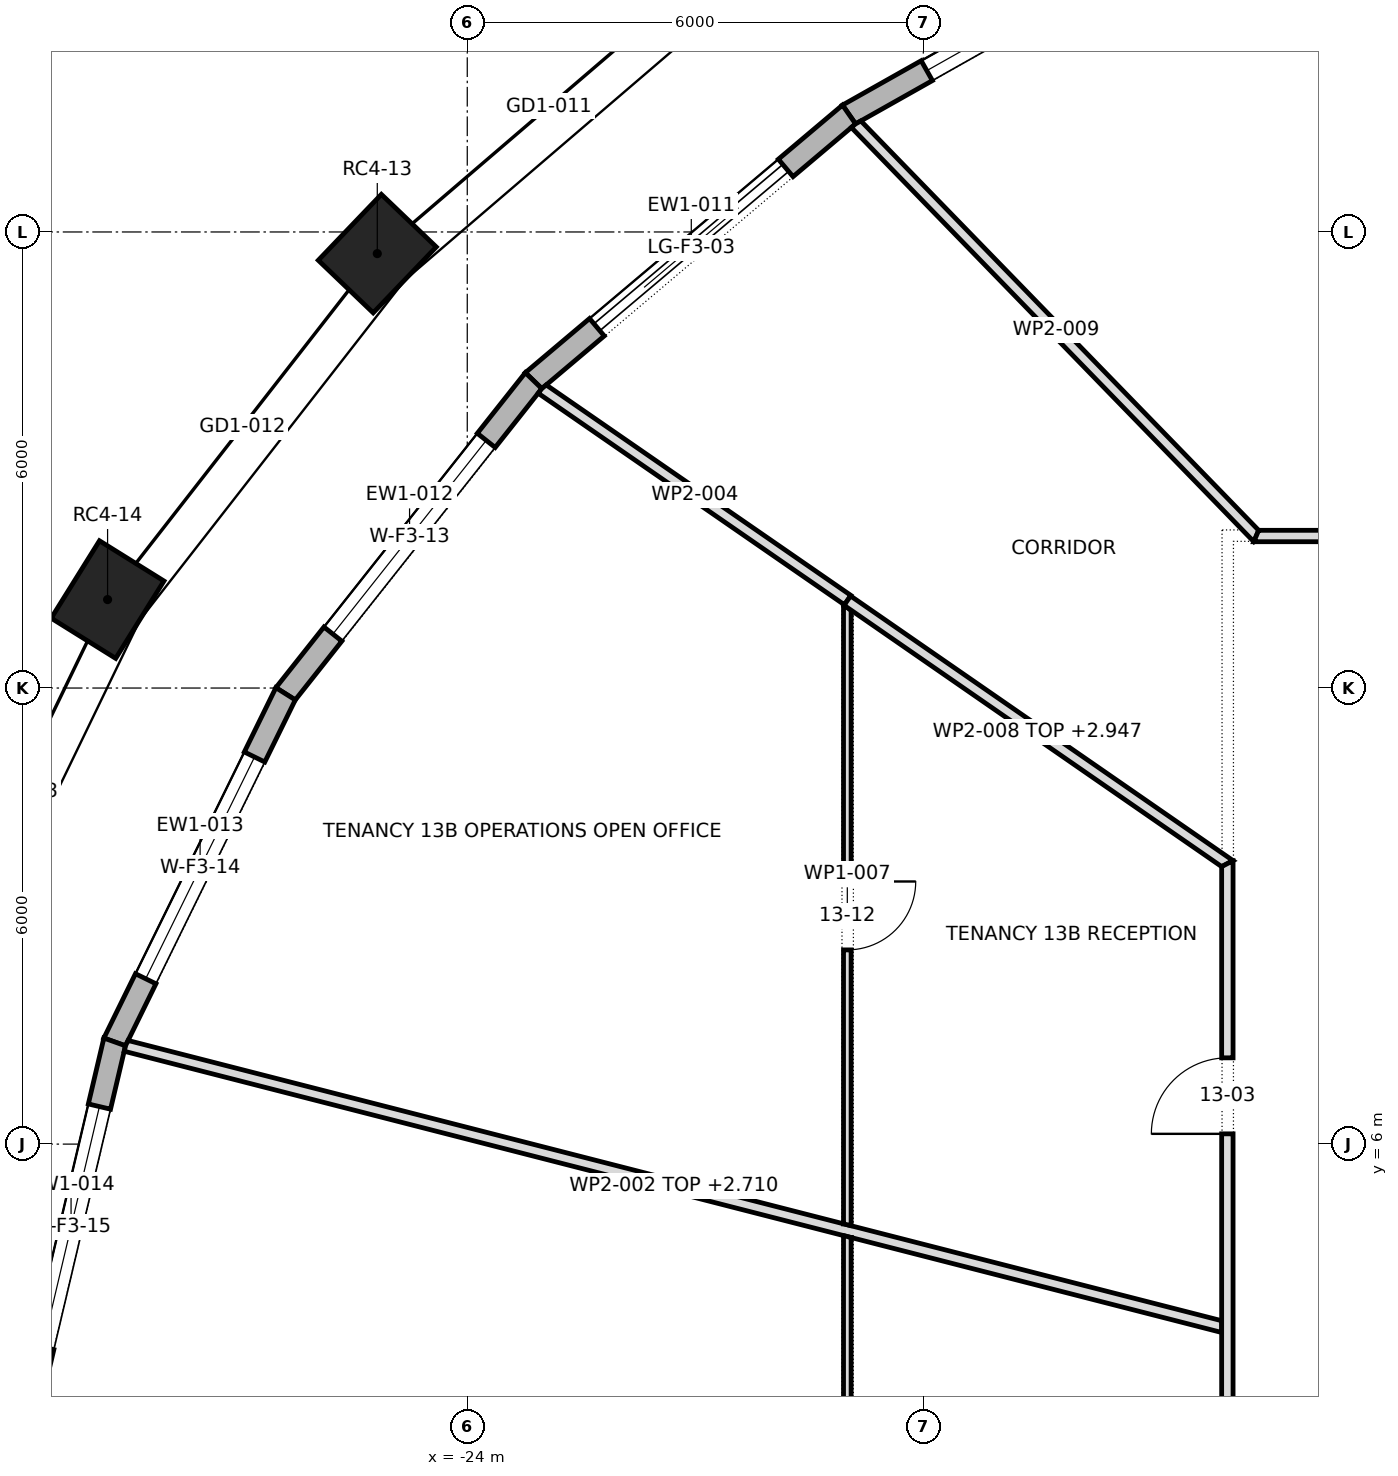
"""IFC4 building model, lengths in metres.
Left out: names, types, materials, properties, quantities, classifications, styles, units other than length and angle.
Written with IfcOpenShell. Run it as: python <this file> out.ifc"""

import sys

from ifc_helpers import new_model, si_unit, direction, frame, frame_2d, origin, origin_2d, place, context, subcontext, project, spatial, polyline, rectangle, outline, extrude, element, fill, save


model = new_model("IFC4")
c1 = context("Model", 3, precision=1e-05, world=origin(), true_north=direction((0.0, 1.0)))
c2 = subcontext(c1, "Body", "Model", "MODEL_VIEW")
j1 = project(units=[si_unit("LENGTHUNIT", "METRE"), si_unit("PLANEANGLEUNIT", "RADIAN")], contexts=[c1])
p1 = place(None, origin())
s1 = spatial("IfcSite", under=j1, at=p1, CompositionType="ELEMENT")
p2 = place(p1, origin())
s2 = spatial("IfcBuilding", under=s1, at=p2, CompositionType="ELEMENT")
p3 = place(p2, frame((0.0, 0.0, 190.9)))
s3 = spatial("IfcBuildingStorey", under=s2, at=p3, CompositionType="ELEMENT", Elevation=190.9)
for number, where, z_axis, x_axis in (
    (1, (-25.184, 17.715, 0.0), (0.0, 0.0, 1.0), (-0.692, -0.722, 0.0)),
    (2, (-28.732, 13.164, 0.0), (0.0, 0.0, 1.0), (-0.529, -0.849, 0.0)),
):
    element("IfcColumn", number, at=place(p3, frame(where, z_axis=z_axis, x_axis=x_axis)), inside=s3, PredefinedType="COLUMN", context=c2, shape_type="SweptSolid", body=[
        extrude(rectangle(XDim=1.2, YDim=1.0, at=origin_2d()), origin(), (0.0, 0.0, 1.0), 4.0),
    ])
p4 = place(p3, frame((-14.1, 22.295, 0.0), z_axis=(0.0, 0.0, 1.0), x_axis=(-0.871083701819, -0.491134588912, 0.0)))
e3 = element("IfcWall", 3, at=p4, inside=s3, PredefinedType="STANDARD", context=c2, shape_type="SweptSolid", body=[
    extrude(outline(polyline([(-0.013, -0.15), (5.614, -0.15), (5.585, 0.15), (0.013, 0.15), (-0.013, -0.15)])), origin(), (0.0, 0.0, 1.0), 3.7),
])
p5 = place(p4, frame((1.175, 0.0, 0.6)))
e4 = element("IfcOpeningElement", 4, at=p5, cuts=e3, PredefinedType="OPENING", context=c2, shape_type="SweptSolid", body=[
    extrude(rectangle(XDim=3.25, YDim=2.65, at=frame_2d((1.625, 1.325))), frame((0.0, 0.162, 0.0), z_axis=(0.0, -1.0, 0.0), x_axis=(1.0, 0.0, 0.0)), (0.0, 0.0, 1.0), 0.324),
])
p6 = place(p3, frame((-18.977, 19.545, 0.0), z_axis=(0.0, 0.0, 1.0), x_axis=(-0.764330261608, -0.644824977176, 0.0)))
e5 = element("IfcWall", 5, at=p6, inside=s3, PredefinedType="STANDARD", context=c2, shape_type="SweptSolid", body=[
    extrude(outline(polyline([(-0.014, -0.15), (5.445, -0.15), (5.415, 0.15), (0.014, 0.15), (-0.014, -0.15)])), origin(), (0.0, 0.0, 1.0), 3.7),
])
p7 = place(p6, frame((1.09, 0.0, 0.0)))
e6 = element("IfcOpeningElement", 6, at=p7, cuts=e5, PredefinedType="OPENING", context=c2, shape_type="SweptSolid", body=[
    extrude(rectangle(XDim=3.25, YDim=3.25, at=frame_2d((1.625, 1.625))), frame((0.0, 0.162, 0.0), z_axis=(0.0, -1.0, 0.0), x_axis=(1.0, 0.0, 0.0)), (0.0, 0.0, 1.0), 0.324),
])
p8 = place(p3, frame((-23.128, 16.044, 0.0), z_axis=(0.0, 0.0, 1.0), x_axis=(-0.620829074232, -0.783945955145, 0.0)))
e7 = element("IfcWall", 7, at=p8, inside=s3, PredefinedType="STANDARD", context=c2, shape_type="SweptSolid", body=[
    extrude(outline(polyline([(-0.015, -0.15), (5.271, -0.15), (5.239, 0.15), (0.015, 0.15), (-0.015, -0.15)])), origin(), (0.0, 0.0, 1.0), 3.7),
])
p9 = place(p8, frame((1.003, 0.0, 0.6)))
e8 = element("IfcOpeningElement", 8, at=p9, cuts=e7, PredefinedType="OPENING", context=c2, shape_type="SweptSolid", body=[
    extrude(rectangle(XDim=3.25, YDim=2.65, at=frame_2d((1.625, 1.325))), frame((0.0, 0.162, 0.0), z_axis=(0.0, -1.0, 0.0), x_axis=(1.0, 0.0, 0.0)), (0.0, 0.0, 1.0), 0.324),
])
p10 = place(p3, frame((-26.39, 11.924, 0.0), z_axis=(0.0, 0.0, 1.0), x_axis=(-0.440694221881, -0.897657285829, 0.0)))
e9 = element("IfcWall", 9, at=p10, inside=s3, PredefinedType="STANDARD", context=c2, shape_type="SweptSolid", body=[
    extrude(outline(polyline([(-0.016, -0.15), (5.119, -0.15), (5.085, 0.15), (0.016, 0.15), (-0.016, -0.15)])), origin(), (0.0, 0.0, 1.0), 3.7),
])
p11 = place(p10, frame((0.926, 0.0, 0.6)))
e10 = element("IfcOpeningElement", 10, at=p11, cuts=e9, PredefinedType="OPENING", context=c2, shape_type="SweptSolid", body=[
    extrude(rectangle(XDim=3.25, YDim=2.65, at=frame_2d((1.625, 1.325))), frame((0.0, 0.162, 0.0), z_axis=(0.0, -1.0, 0.0), x_axis=(1.0, 0.0, 0.0)), (0.0, 0.0, 1.0), 0.324),
])
p12 = place(p3, frame((-28.639, 7.344, 0.0), z_axis=(0.0, 0.0, 1.0), x_axis=(-0.229455912692, -0.97331905567, 0.0)))
e11 = element("IfcWall", 11, at=p12, inside=s3, PredefinedType="STANDARD", context=c2, shape_type="SweptSolid", body=[
    extrude(outline(polyline([(-0.017, -0.15), (5.015, -0.15), (4.98, 0.15), (0.017, 0.15), (-0.017, -0.15)])), origin(), (0.0, 0.0, 1.0), 3.7),
])
p13 = place(p12, frame((0.874, 0.0, 0.6)))
e12 = element("IfcOpeningElement", 12, at=p13, cuts=e11, PredefinedType="OPENING", context=c2, shape_type="SweptSolid", body=[
    extrude(rectangle(XDim=3.25, YDim=2.65, at=frame_2d((1.625, 1.325))), frame((0.0, 0.162, 0.0), z_axis=(0.0, -1.0, 0.0), x_axis=(1.0, 0.0, 0.0)), (0.0, 0.0, 1.0), 0.324),
])
p14 = place(p3, frame((-28.494, 7.294, 0.0), z_axis=(0.0, 0.0, 1.0), x_axis=(0.96870063855, -0.248231893342, 0.0)))
e13 = element("IfcWall", 13, at=p14, inside=s3, PredefinedType="PARTITIONING", context=c2, shape_type="SweptSolid", body=[
    extrude(outline(polyline([(0.0, -0.075), (1.973, -0.075), (3.947, -0.075), (5.92, -0.075), (7.893, -0.075), (9.866, -0.075), (9.872, -0.073), (9.872, -0.075), (11.549, -0.075), (13.227, -0.075), (14.904, -0.075), (14.904, -0.074), (14.866, 0.075), (13.156, 0.075), (11.446, 0.075), (9.736, 0.075), (9.731, 0.073), (9.73, 0.075), (7.787, 0.075), (5.844, 0.075), (3.901, 0.075), (1.957, 0.075), (0.014, 0.075), (0.0, 0.008), (0.0, -0.075)])), origin(), (0.0, 0.0, 1.0), 2.71),
])
p15 = place(p3, frame((-23.024, 15.94, 0.0), z_axis=(0.0, 0.0, 1.0), x_axis=(0.822739240619, -0.568418984505, 0.0)))
e14 = element("IfcWall", 14, at=p15, inside=s3, PredefinedType="PARTITIONING", context=c2, shape_type="SweptSolid", body=[
    extrude(outline(polyline([(4.897, 0.075), (3.273, 0.075), (1.649, 0.075), (0.025, 0.075), (0.005, 0.002), (0.0, -0.069), (0.0, -0.075), (1.632, -0.075), (3.264, -0.075), (4.897, -0.075), (4.897, 0.075)])), origin(), (0.0, 0.0, 1.0), 3.7),
])
p16 = place(p3, frame((-19.0, -4.796, 0.0), z_axis=(0.0, 0.0, 1.0), x_axis=(0.0, 1.0, 0.0)))
e15 = element("IfcWall", 15, at=p16, inside=s3, PredefinedType="PARTITIONING", context=c2, shape_type="SweptSolid", body=[
    extrude(outline(polyline([(0.025, -0.05), (1.934, -0.05), (3.842, -0.05), (5.75, -0.05), (7.659, -0.05), (9.567, -0.05), (9.593, 0.049), (9.593, 0.05), (7.674, 0.05), (5.756, 0.05), (3.837, 0.05), (1.918, 0.05), (0.0, 0.05), (0.0, 0.049), (0.025, -0.05)])), origin(), (0.0, 0.0, 1.0), 3.7),
])
p17 = place(p16, frame((4.346, 0.0, 0.0)))
e16 = element("IfcOpeningElement", 16, at=p17, cuts=e15, PredefinedType="OPENING", context=c2, shape_type="SweptSolid", body=[
    extrude(rectangle(XDim=0.9, YDim=2.1, at=frame_2d((0.45, 1.05))), frame((0.0, 0.062, 0.0), z_axis=(0.0, -1.0, 0.0), x_axis=(1.0, 0.0, 0.0)), (0.0, 0.0, 1.0), 0.124),
])
p18 = place(p3, frame((-19.0, 4.926, 0.0), z_axis=(0.0, 0.0, 1.0), x_axis=(0.0, 1.0, 0.0)))
e17 = element("IfcWall", 17, at=p18, inside=s3, PredefinedType="PARTITIONING", context=c2, shape_type="SweptSolid", body=[
    extrude(outline(polyline([(0.0, -0.05), (1.62, -0.05), (3.239, -0.05), (4.859, -0.05), (6.479, -0.05), (8.098, -0.05), (8.162, 0.043), (8.169, 0.038), (8.177, 0.05), (8.177, 0.05), (6.547, 0.05), (4.917, 0.05), (3.286, 0.05), (1.656, 0.05), (0.025, 0.05), (0.0, -0.049), (0.0, -0.05)])), origin(), (0.0, 0.0, 1.0), 3.7),
])
p19 = place(p18, frame((3.629, 0.0, 0.0)))
e18 = element("IfcOpeningElement", 18, at=p19, cuts=e17, PredefinedType="OPENING", context=c2, shape_type="SweptSolid", body=[
    extrude(rectangle(XDim=0.9, YDim=2.1, at=frame_2d((0.45, 1.05))), frame((0.0, 0.062, 0.0), z_axis=(0.0, -1.0, 0.0), x_axis=(1.0, 0.0, 0.0)), (0.0, 0.0, 1.0), 0.124),
])
p20 = place(p3, frame((-19.0, 13.15, 0.0), z_axis=(0.0, 0.0, 1.0), x_axis=(0.822301327334, -0.569052306088, 0.0)))
e19 = element("IfcWall", 19, at=p20, inside=s3, PredefinedType="PARTITIONING", context=c2, shape_type="SweptSolid", body=[
    extrude(outline(polyline([(0.0, -0.075), (1.51, -0.075), (3.021, -0.075), (4.531, -0.075), (6.041, -0.075), (6.12, 0.075), (4.59, 0.075), (3.06, 0.075), (1.53, 0.075), (0.0, 0.075), (0.0, -0.075)])), origin(), (0.0, 0.0, 1.0), 2.947),
])
p21 = place(p3, frame((-18.893, 19.427, 0.0), z_axis=(0.0, 0.0, 1.0), x_axis=(0.696864554069, -0.717202756048, 0.0)))
e20 = element("IfcWall", 20, at=p21, inside=s3, PredefinedType="PARTITIONING", context=c2, shape_type="SweptSolid", body=[
    extrude(outline(polyline([(0.0, -0.075), (1.9, -0.075), (3.799, -0.075), (5.699, -0.075), (7.599, -0.075), (7.567, 0.0), (7.535, 0.075), (5.658, 0.075), (3.78, 0.075), (1.903, 0.075), (0.025, 0.075), (0.005, -0.003), (0.0, -0.073), (0.0, -0.075)])), origin(), (0.0, 0.0, 1.0), 3.7),
])
p22 = place(p3, frame((-14.0, -9.729, 0.0), z_axis=(0.0, 0.0, 1.0), x_axis=(0.0, 1.0, 0.0)))
e21 = element("IfcWall", 21, at=p22, inside=s3, PredefinedType="PARTITIONING", context=c2, shape_type="SweptSolid", body=[
    extrude(outline(polyline([(19.458, -0.075), (19.458, -0.075), (19.38, 0.075), (17.45, 0.075), (15.52, 0.075), (13.59, 0.075), (11.659, 0.075), (9.729, 0.075), (7.799, 0.075), (5.869, 0.075), (3.939, 0.075), (2.009, 0.075), (0.079, 0.075), (0.0, -0.075), (0.0, -0.075), (1.946, -0.075), (3.892, -0.075), (5.838, -0.075), (7.783, -0.075), (9.729, -0.075), (11.675, -0.075), (13.621, -0.075), (15.567, -0.075), (17.513, -0.075), (19.458, -0.075)])), origin(), (0.0, 0.0, 1.0), 3.7),
])
p23 = place(p22, frame((15.864, 0.0, 0.0)))
e22 = element("IfcOpeningElement", 22, at=p23, cuts=e21, PredefinedType="OPENING", context=c2, shape_type="SweptSolid", body=[
    extrude(rectangle(XDim=1.0, YDim=2.1, at=frame_2d((0.5, 1.05))), frame((0.0, 0.087, 0.0), z_axis=(0.0, -1.0, 0.0), x_axis=(1.0, 0.0, 0.0)), (0.0, 0.0, 1.0), 0.174),
])
p24 = place(p22, frame((9.229, 0.0, 0.0)))
e23 = element("IfcOpeningElement", 23, at=p24, cuts=e21, PredefinedType="OPENING", context=c2, shape_type="SweptSolid", body=[
    extrude(rectangle(XDim=1.0, YDim=2.1, at=frame_2d((0.5, 1.05))), frame((0.0, 0.087, 0.0), z_axis=(0.0, -1.0, 0.0), x_axis=(1.0, 0.0, 0.0)), (0.0, 0.0, 1.0), 0.174),
])
p25 = place(p22, frame((2.594, 0.0, 0.0)))
e24 = element("IfcOpeningElement", 24, at=p25, cuts=e21, PredefinedType="OPENING", context=c2, shape_type="SweptSolid", body=[
    extrude(rectangle(XDim=1.0, YDim=2.1, at=frame_2d((0.5, 1.05))), frame((0.0, 0.087, 0.0), z_axis=(0.0, -1.0, 0.0), x_axis=(1.0, 0.0, 0.0)), (0.0, 0.0, 1.0), 0.174),
])
p26 = place(p3, frame((-13.652, 14.0, 0.0), z_axis=(0.0, 0.0, 1.0), x_axis=(1.0, 0.0, 0.0)))
e25 = element("IfcWall", 25, at=p26, inside=s3, PredefinedType="PARTITIONING", context=c2, shape_type="SweptSolid", body=[
    extrude(outline(polyline([(27.303, -0.075), (27.303, -0.075), (27.24, 0.075), (25.299, 0.075), (23.358, 0.075), (21.416, 0.075), (19.475, 0.075), (17.534, 0.075), (15.593, 0.075), (13.652, 0.075), (11.71, 0.075), (9.769, 0.075), (7.828, 0.075), (5.887, 0.075), (3.946, 0.075), (2.004, 0.075), (0.063, 0.075), (0.0, -0.075), (0.0, -0.075), (1.95, -0.075), (3.9, -0.075), (5.851, -0.075), (7.801, -0.075), (9.751, -0.075), (11.701, -0.075), (13.652, -0.075), (15.602, -0.075), (17.552, -0.075), (19.502, -0.075), (21.453, -0.075), (23.403, -0.075), (25.353, -0.075), (27.303, -0.075)])), origin(), (0.0, 0.0, 1.0), 3.7),
])
p27 = place(p26, frame((19.562, 0.0, 0.0)))
e26 = element("IfcOpeningElement", 26, at=p27, cuts=e25, PredefinedType="OPENING", context=c2, shape_type="SweptSolid", body=[
    extrude(rectangle(XDim=1.8, YDim=2.1, at=frame_2d((0.9, 1.05))), frame((0.0, 0.087, 0.0), z_axis=(0.0, -1.0, 0.0), x_axis=(1.0, 0.0, 0.0)), (0.0, 0.0, 1.0), 0.174),
])
p28 = place(p26, frame((5.942, 0.0, 0.0)))
e27 = element("IfcOpeningElement", 27, at=p28, cuts=e25, PredefinedType="OPENING", context=c2, shape_type="SweptSolid", body=[
    extrude(rectangle(XDim=1.8, YDim=2.1, at=frame_2d((0.9, 1.05))), frame((0.0, 0.087, 0.0), z_axis=(0.0, -1.0, 0.0), x_axis=(1.0, 0.0, 0.0)), (0.0, 0.0, 1.0), 0.174),
])
p29 = place(p5, origin())
e28 = element("IfcWindow", 28, at=p29, inside=s3, PartitioningType="TRIPLE_PANEL_VERTICAL", PredefinedType="WINDOW", context=c2, shape_type="SweptSolid", body=[
    extrude(rectangle(XDim=3.25, YDim=2.65, at=frame_2d((1.625, 1.325))), frame((0.0, 0.03, 0.0), z_axis=(0.0, -1.0, 0.0), x_axis=(1.0, 0.0, 0.0)), (0.0, 0.0, 1.0), 0.06),
])
fill(e4, e28)
p30 = place(p7, origin())
e29 = element("IfcDoor", 29, at=p30, inside=s3, OperationType="DOUBLE_DOOR_SLIDING", PredefinedType="DOOR", context=c2, shape_type="SweptSolid", body=[
    extrude(rectangle(XDim=3.25, YDim=3.25, at=frame_2d((1.625, 1.625))), frame((0.0, 0.025, 0.0), z_axis=(0.0, -1.0, 0.0), x_axis=(1.0, 0.0, 0.0)), (0.0, 0.0, 1.0), 0.05),
])
fill(e6, e29)
p31 = place(p9, origin())
e30 = element("IfcWindow", 30, at=p31, inside=s3, PartitioningType="TRIPLE_PANEL_VERTICAL", PredefinedType="WINDOW", context=c2, shape_type="SweptSolid", body=[
    extrude(rectangle(XDim=3.25, YDim=2.65, at=frame_2d((1.625, 1.325))), frame((0.0, 0.03, 0.0), z_axis=(0.0, -1.0, 0.0), x_axis=(1.0, 0.0, 0.0)), (0.0, 0.0, 1.0), 0.06),
])
fill(e8, e30)
p32 = place(p11, origin())
e31 = element("IfcWindow", 31, at=p32, inside=s3, PartitioningType="TRIPLE_PANEL_VERTICAL", PredefinedType="WINDOW", context=c2, shape_type="SweptSolid", body=[
    extrude(rectangle(XDim=3.25, YDim=2.65, at=frame_2d((1.625, 1.325))), frame((0.0, 0.03, 0.0), z_axis=(0.0, -1.0, 0.0), x_axis=(1.0, 0.0, 0.0)), (0.0, 0.0, 1.0), 0.06),
])
fill(e10, e31)
p33 = place(p13, origin())
e32 = element("IfcWindow", 32, at=p33, inside=s3, PartitioningType="TRIPLE_PANEL_VERTICAL", PredefinedType="WINDOW", context=c2, shape_type="SweptSolid", body=[
    extrude(rectangle(XDim=3.25, YDim=2.65, at=frame_2d((1.625, 1.325))), frame((0.0, 0.03, 0.0), z_axis=(0.0, -1.0, 0.0), x_axis=(1.0, 0.0, 0.0)), (0.0, 0.0, 1.0), 0.06),
])
fill(e12, e32)
p34 = place(p23, origin())
e33 = element("IfcDoor", 33, at=p34, inside=s3, OperationType="SINGLE_SWING_RIGHT", PredefinedType="DOOR", context=c2, shape_type="SweptSolid", body=[
    extrude(rectangle(XDim=1.0, YDim=2.1, at=frame_2d((0.5, 1.05))), frame((0.0, 0.025, 0.0), z_axis=(0.0, -1.0, 0.0), x_axis=(1.0, 0.0, 0.0)), (0.0, 0.0, 1.0), 0.05),
])
fill(e22, e33)
p35 = place(p19, frame((0.9, 0.0, 0.0), z_axis=(0.0, 0.0, 1.0), x_axis=(-1.0, 0.0, 0.0)))
e34 = element("IfcDoor", 34, at=p35, inside=s3, OperationType="SINGLE_SWING_RIGHT", PredefinedType="DOOR", context=c2, shape_type="SweptSolid", body=[
    extrude(rectangle(XDim=0.9, YDim=2.1, at=frame_2d((0.45, 1.05))), frame((0.0, 0.025, 0.0), z_axis=(0.0, -1.0, 0.0), x_axis=(1.0, 0.0, 0.0)), (0.0, 0.0, 1.0), 0.05),
])
fill(e18, e34)
save(model, sys.argv[1])
